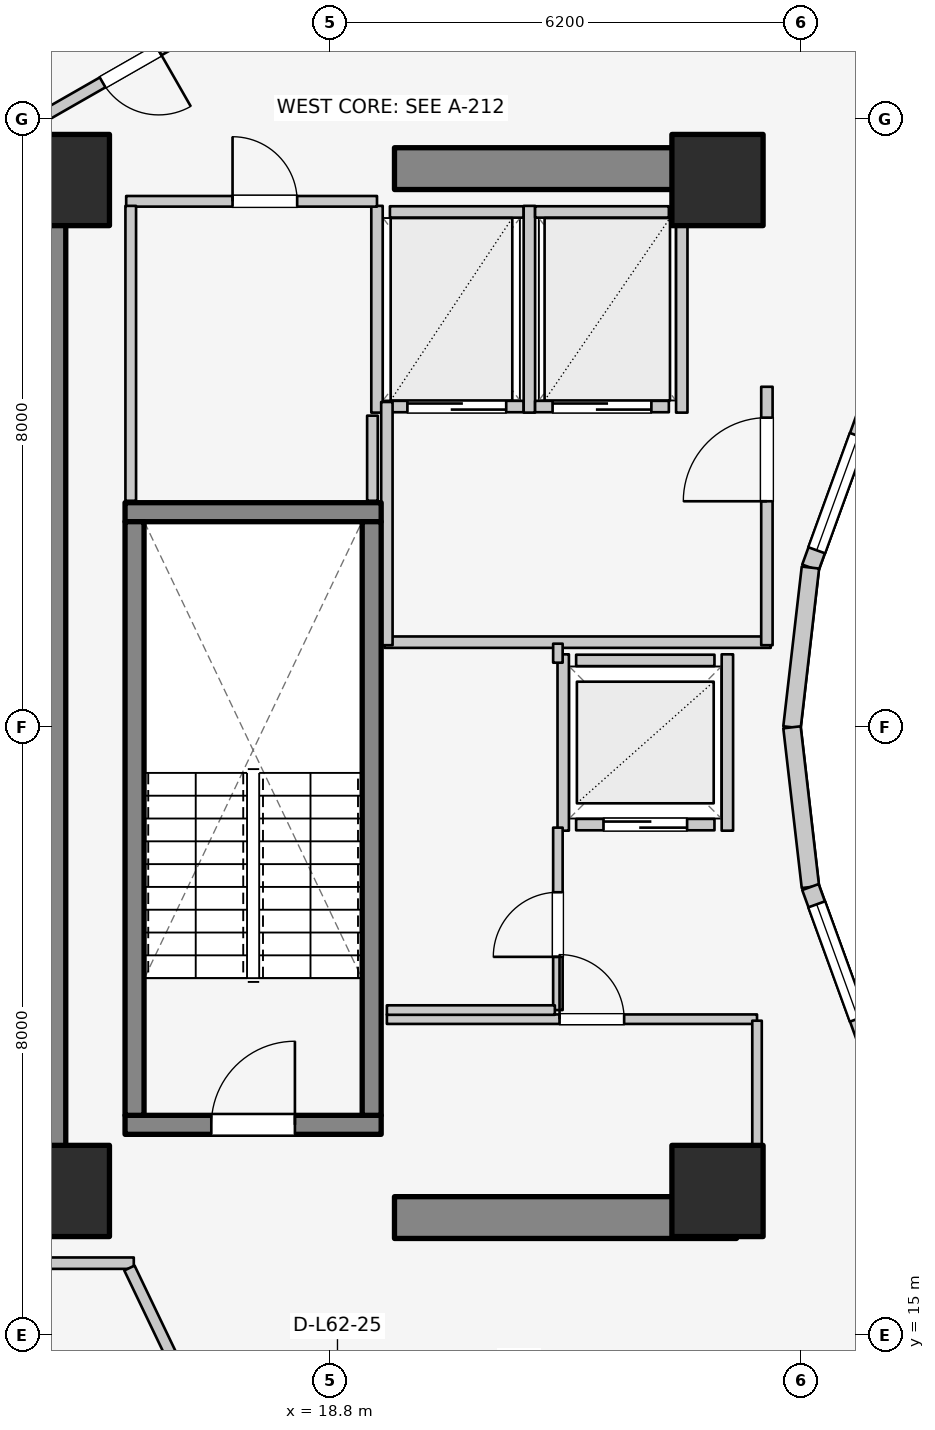
"""IFC4 building model, lengths in metres.
Left out: names, types, materials, properties, quantities, classifications, styles, units other than length and angle.
Written with IfcOpenShell. Run it as: python <this file> out.ifc"""

import sys

from ifc_helpers import new_model, si_unit, direction, frame, frame_2d, origin, origin_2d, place, context, subcontext, project, spatial, rectangle, extrude, element, fill, save


model = new_model("IFC4")
c1 = context("Model", 3, precision=1e-05, world=origin(), true_north=direction((0.0, 1.0)))
c2 = subcontext(c1, "Body", "Model", "MODEL_VIEW")
j1 = project(units=[si_unit("LENGTHUNIT", "METRE"), si_unit("PLANEANGLEUNIT", "RADIAN")], contexts=[c1])
p1 = place(None, origin())
s1 = spatial("IfcSite", under=j1, at=p1, CompositionType="ELEMENT")
p2 = place(p1, origin())
s2 = spatial("IfcBuilding", under=s1, at=p2, CompositionType="ELEMENT")
p3 = place(p2, frame((0.0, 0.0, 204.7)))
s3 = spatial("IfcBuildingStorey", under=s2, at=p3, CompositionType="ELEMENT", Elevation=204.7)
p4 = place(p3, frame((15.05, 17.05, 0.0), z_axis=(0.0, 0.0, 1.0), x_axis=(0.0, 1.0, 0.0)))
e1 = element("IfcWall", 1, at=p4, inside=s3, PredefinedType="SHEAR", context=c2, shape_type="SweptSolid", body=[
    extrude(rectangle(XDim=12.8, YDim=0.55, at=frame_2d((6.4, 0.0))), origin(), (0.0, 0.0, 1.0), 3.1),
])
for number, where, z_axis, x_axis in (
    (2, (19.65, 16.55, 0.0), (0.0, 0.0, 1.0), (1.0, 0.0, 0.0)),
    (3, (19.65, 30.35, 0.0), (0.0, 0.0, 1.0), (1.0, 0.0, 0.0)),
):
    element("IfcWall", number, at=place(p3, frame(where, z_axis=z_axis, x_axis=x_axis)), inside=s3, PredefinedType="SHEAR", context=c2, shape_type="SweptSolid", body=[
        extrude(rectangle(XDim=4.5, YDim=0.55, at=frame_2d((2.25, 0.0))), origin(), (0.0, 0.0, 1.0), 3.1),
    ])
p5 = place(p3, frame((16.105, 17.77, 0.0), z_axis=(0.0, 0.0, 1.0), x_axis=(1.0, 0.0, 0.0)))
e4 = element("IfcWall", 4, at=p5, inside=s3, PredefinedType="SOLIDWALL", context=c2, shape_type="SweptSolid", body=[
    extrude(rectangle(XDim=3.37, YDim=0.25, at=frame_2d((1.685, 0.0))), origin(), (0.0, 0.0, 1.0), 3.1),
])
p6 = place(p5, frame((1.135, 0.0, 0.0)))
e5 = element("IfcOpeningElement", 5, at=p6, cuts=e4, PredefinedType="OPENING", context=c2, shape_type="SweptSolid", body=[
    extrude(rectangle(XDim=1.1, YDim=2.1, at=frame_2d((0.55, 1.05))), frame((0.0, 0.135, 0.0), z_axis=(0.0, -1.0, 0.0), x_axis=(1.0, 0.0, 0.0)), (0.0, 0.0, 1.0), 0.27),
])
p7 = place(p3, frame((16.105, 25.83, 0.0), z_axis=(0.0, 0.0, 1.0), x_axis=(1.0, 0.0, 0.0)))
e6 = element("IfcWall", 6, at=p7, inside=s3, PredefinedType="SOLIDWALL", context=c2, shape_type="SweptSolid", body=[
    extrude(rectangle(XDim=3.37, YDim=0.25, at=frame_2d((1.685, 0.0))), origin(), (0.0, 0.0, 1.0), 3.1),
])
for number, where, z_axis, x_axis in (
    (7, (16.23, 17.895, 0.0), (0.0, 0.0, 1.0), (0.0, 1.0, 0.0)),
    (8, (19.35, 17.895, 0.0), (0.0, 0.0, 1.0), (0.0, 1.0, 0.0)),
):
    element("IfcWall", number, at=place(p3, frame(where, z_axis=z_axis, x_axis=x_axis)), inside=s3, PredefinedType="SOLIDWALL", context=c2, shape_type="SweptSolid", body=[
        extrude(rectangle(XDim=7.81, YDim=0.25, at=frame_2d((3.905, 0.0))), origin(), (0.0, 0.0, 1.0), 3.1),
    ])
for number, where, z_axis, x_axis in (
    (9, (15.3, 16.9, 0.0), (0.0, 0.0, 1.0), (1.0, 0.0, 0.0)),
    (10, (23.9, 16.9, 0.0), (0.0, 0.0, 1.0), (1.0, 0.0, 0.0)),
    (11, (23.9, 30.2, 0.0), (0.0, 0.0, 1.0), (1.0, 0.0, 0.0)),
    (12, (15.3, 30.2, 0.0), (0.0, 0.0, 1.0), (1.0, 0.0, 0.0)),
):
    element("IfcColumn", number, at=place(p3, frame(where, z_axis=z_axis, x_axis=x_axis)), inside=s3, PredefinedType="COLUMN", context=c2, shape_type="SweptSolid", body=[
        extrude(rectangle(XDim=1.2, YDim=1.2, at=origin_2d()), origin(), (0.0, 0.0, 1.0), 3.1),
    ])
p8 = place(p3, frame((25.834, 27.06, 0.0), z_axis=(0.0, 0.0, 1.0), x_axis=(-0.341423187295, -0.93990968033, 0.0)))
e13 = element("IfcWall", 13, at=p8, inside=s3, PredefinedType="STANDARD", context=c2, shape_type="SweptSolid", body=[
    extrude(rectangle(XDim=2.084, YDim=0.23, at=frame_2d((1.042, 0.0))), origin(), (0.0, 0.0, 1.0), 2.84),
])
p9 = place(p8, frame((0.242, 0.0, 0.85)))
e14 = element("IfcOpeningElement", 14, at=p9, cuts=e13, PredefinedType="OPENING", context=c2, shape_type="SweptSolid", body=[
    extrude(rectangle(XDim=1.6, YDim=1.65, at=frame_2d((0.8, 0.825))), frame((0.0, 0.125, 0.0), z_axis=(0.0, -1.0, 0.0), x_axis=(1.0, 0.0, 0.0)), (0.0, 0.0, 1.0), 0.25),
])
for number, where, z_axis, x_axis in (
    (15, (25.123, 25.102, 0.0), (0.0, 0.0, 1.0), (-0.115, -0.993, 0.0)),
    (16, (24.88, 23.0, 0.0), (0.0, 0.0, 1.0), (0.115, -0.993, 0.0)),
):
    element("IfcWall", number, at=place(p3, frame(where, z_axis=z_axis, x_axis=x_axis)), inside=s3, PredefinedType="STANDARD", context=c2, shape_type="SweptSolid", body=[
        extrude(rectangle(XDim=2.115, YDim=0.23, at=frame_2d((1.058, 0.0))), origin(), (0.0, 0.0, 1.0), 2.84),
    ])
p10 = place(p3, frame((25.123, 20.898, 0.0), z_axis=(0.0, 0.0, 1.0), x_axis=(0.341423187295, -0.93990968033, 0.0)))
e17 = element("IfcWall", 17, at=p10, inside=s3, PredefinedType="STANDARD", context=c2, shape_type="SweptSolid", body=[
    extrude(rectangle(XDim=2.084, YDim=0.23, at=frame_2d((1.042, 0.0))), origin(), (0.0, 0.0, 1.0), 2.84),
])
p11 = place(p10, frame((0.242, 0.0, 0.85)))
e18 = element("IfcOpeningElement", 18, at=p11, cuts=e17, PredefinedType="OPENING", context=c2, shape_type="SweptSolid", body=[
    extrude(rectangle(XDim=1.6, YDim=1.65, at=frame_2d((0.8, 0.825))), frame((0.0, 0.125, 0.0), z_axis=(0.0, -1.0, 0.0), x_axis=(1.0, 0.0, 0.0)), (0.0, 0.0, 1.0), 0.25),
])
p12 = place(p3, frame((16.442, 34.272, 0.0), z_axis=(0.0, 0.0, 1.0), x_axis=(-0.792713817907, -0.609593965603, 0.0)))
e19 = element("IfcWall", 19, at=p12, inside=s3, PredefinedType="STANDARD", context=c2, shape_type="SweptSolid", body=[
    extrude(rectangle(XDim=4.041, YDim=0.26, at=frame_2d((2.021, 0.0))), origin(), (0.0, 0.0, 1.0), 2.85),
])
p13 = place(p12, frame((2.264, 0.0, 0.75)))
e20 = element("IfcOpeningElement", 20, at=p13, cuts=e19, PredefinedType="OPENING", context=c2, shape_type="SweptSolid", body=[
    extrude(rectangle(XDim=1.2, YDim=1.5, at=frame_2d((0.6, 0.75))), frame((0.0, 0.14, 0.0), z_axis=(0.0, -1.0, 0.0), x_axis=(1.0, 0.0, 0.0)), (0.0, 0.0, 1.0), 0.28),
])
p14 = place(p3, frame((22.04, 21.72, 0.0), z_axis=(0.0, 0.0, 1.0), x_axis=(1.0, 0.0, 0.0)))
e21 = element("IfcWall", 21, at=p14, inside=s3, PredefinedType="SOLIDWALL", context=c2, shape_type="SweptSolid", body=[
    extrude(rectangle(XDim=1.82, YDim=0.15, at=frame_2d((0.91, 0.0))), origin(), (0.0, 0.0, 1.0), 2.12),
])
p15 = place(p14, frame((0.36, 0.0, 0.0)))
e22 = element("IfcOpeningElement", 22, at=p15, cuts=e21, PredefinedType="OPENING", context=c2, shape_type="SweptSolid", body=[
    extrude(rectangle(XDim=1.1, YDim=2.1, at=frame_2d((0.55, 1.05))), frame((0.0, 0.085, 0.0), z_axis=(0.0, -1.0, 0.0), x_axis=(1.0, 0.0, 0.0)), (0.0, 0.0, 1.0), 0.17),
])
p16 = place(p3, frame((22.04, 23.88, 0.0), z_axis=(0.0, 0.0, 1.0), x_axis=(1.0, 0.0, 0.0)))
e23 = element("IfcWall", 23, at=p16, inside=s3, PredefinedType="SOLIDWALL", context=c2, shape_type="SweptSolid", body=[
    extrude(rectangle(XDim=1.82, YDim=0.15, at=frame_2d((0.91, 0.0))), origin(), (0.0, 0.0, 1.0), 2.12),
])
p17 = place(p3, frame((21.87, 21.64, 0.0), z_axis=(0.0, 0.0, 1.0), x_axis=(0.0, 1.0, 0.0)))
e24 = element("IfcWall", 24, at=p17, inside=s3, PredefinedType="SOLIDWALL", context=c2, shape_type="SweptSolid", body=[
    extrude(rectangle(XDim=2.32, YDim=0.15, at=frame_2d((1.16, 0.0))), origin(), (0.0, 0.0, 1.0), 2.855),
])
p18 = place(p3, frame((24.03, 21.64, 0.0), z_axis=(0.0, 0.0, 1.0), x_axis=(0.0, 1.0, 0.0)))
e25 = element("IfcWall", 25, at=p18, inside=s3, PredefinedType="SOLIDWALL", context=c2, shape_type="SweptSolid", body=[
    extrude(rectangle(XDim=2.32, YDim=0.15, at=frame_2d((1.16, 0.0))), origin(), (0.0, 0.0, 1.0), 2.12),
])
p19 = place(p3, frame((19.59, 27.22, 0.0), z_axis=(0.0, 0.0, 1.0), x_axis=(1.0, 0.0, 0.0)))
e26 = element("IfcWall", 26, at=p19, inside=s3, PredefinedType="SOLIDWALL", context=c2, shape_type="SweptSolid", body=[
    extrude(rectangle(XDim=1.76, YDim=0.15, at=frame_2d((0.88, 0.0))), origin(), (0.0, 0.0, 1.0), 2.855),
])
p20 = place(p19, frame((0.23, 0.0, 0.0)))
e27 = element("IfcOpeningElement", 27, at=p20, cuts=e26, PredefinedType="OPENING", context=c2, shape_type="SweptSolid", body=[
    extrude(rectangle(XDim=1.3, YDim=2.1, at=frame_2d((0.65, 1.05))), frame((0.0, 0.085, 0.0), z_axis=(0.0, -1.0, 0.0), x_axis=(1.0, 0.0, 0.0)), (0.0, 0.0, 1.0), 0.17),
])
p21 = place(p3, frame((19.59, 29.78, 0.0), z_axis=(0.0, 0.0, 1.0), x_axis=(1.0, 0.0, 0.0)))
e28 = element("IfcWall", 28, at=p21, inside=s3, PredefinedType="SOLIDWALL", context=c2, shape_type="SweptSolid", body=[
    extrude(rectangle(XDim=1.76, YDim=0.15, at=frame_2d((0.88, 0.0))), origin(), (0.0, 0.0, 1.0), 2.855),
])
for number, where, z_axis, x_axis in (
    (29, (19.42, 27.14, 0.0), (0.0, 0.0, 1.0), (0.0, 1.0, 0.0)),
    (30, (21.425, 27.14, 0.0), (0.0, 0.0, 1.0), (0.0, 1.0, 0.0)),
):
    element("IfcWall", number, at=place(p3, frame(where, z_axis=z_axis, x_axis=x_axis)), inside=s3, PredefinedType="SOLIDWALL", context=c2, shape_type="SweptSolid", body=[
        extrude(rectangle(XDim=2.72, YDim=0.15, at=frame_2d((1.36, 0.0))), origin(), (0.0, 0.0, 1.0), 2.855),
    ])
p22 = place(p3, frame((21.5, 27.22, 0.0), z_axis=(0.0, 0.0, 1.0), x_axis=(1.0, 0.0, 0.0)))
e31 = element("IfcWall", 31, at=p22, inside=s3, PredefinedType="SOLIDWALL", context=c2, shape_type="SweptSolid", body=[
    extrude(rectangle(XDim=1.76, YDim=0.15, at=frame_2d((0.88, 0.0))), origin(), (0.0, 0.0, 1.0), 2.855),
])
p23 = place(p22, frame((0.23, 0.0, 0.0)))
e32 = element("IfcOpeningElement", 32, at=p23, cuts=e31, PredefinedType="OPENING", context=c2, shape_type="SweptSolid", body=[
    extrude(rectangle(XDim=1.3, YDim=2.1, at=frame_2d((0.65, 1.05))), frame((0.0, 0.085, 0.0), z_axis=(0.0, -1.0, 0.0), x_axis=(1.0, 0.0, 0.0)), (0.0, 0.0, 1.0), 0.17),
])
p24 = place(p3, frame((21.5, 29.78, 0.0), z_axis=(0.0, 0.0, 1.0), x_axis=(1.0, 0.0, 0.0)))
e33 = element("IfcWall", 33, at=p24, inside=s3, PredefinedType="SOLIDWALL", context=c2, shape_type="SweptSolid", body=[
    extrude(rectangle(XDim=1.76, YDim=0.15, at=frame_2d((0.88, 0.0))), origin(), (0.0, 0.0, 1.0), 2.855),
])
p25 = place(p3, frame((23.43, 27.14, 0.0), z_axis=(0.0, 0.0, 1.0), x_axis=(0.0, 1.0, 0.0)))
e34 = element("IfcWall", 34, at=p25, inside=s3, PredefinedType="SOLIDWALL", context=c2, shape_type="SweptSolid", body=[
    extrude(rectangle(XDim=2.72, YDim=0.15, at=frame_2d((1.36, 0.0))), origin(), (0.0, 0.0, 1.0), 2.855),
])
p26 = place(p3, frame((19.52, 24.12, 0.0), z_axis=(0.0, 0.0, 1.0), x_axis=(1.0, 0.0, 0.0)))
e35 = element("IfcWall", 35, at=p26, inside=s3, PredefinedType="PARTITIONING", context=c2, shape_type="SweptSolid", body=[
    extrude(rectangle(XDim=5.08, YDim=0.15, at=frame_2d((2.54, 0.0))), origin(), (0.0, 0.0, 1.0), 2.12),
])
p27 = place(p3, frame((19.55, 24.08, 0.0), z_axis=(0.0, 0.0, 1.0), x_axis=(0.0, 1.0, 0.0)))
e36 = element("IfcWall", 36, at=p27, inside=s3, PredefinedType="PARTITIONING", context=c2, shape_type="SweptSolid", body=[
    extrude(rectangle(XDim=3.2, YDim=0.15, at=frame_2d((1.6, 0.0))), origin(), (0.0, 0.0, 1.0), 2.855),
])
p28 = place(p3, frame((24.55, 24.08, 0.0), z_axis=(0.0, 0.0, 1.0), x_axis=(0.0, 1.0, 0.0)))
e37 = element("IfcWall", 37, at=p28, inside=s3, PredefinedType="PARTITIONING", context=c2, shape_type="SweptSolid", body=[
    extrude(rectangle(XDim=3.4, YDim=0.15, at=frame_2d((1.7, 0.0))), origin(), (0.0, 0.0, 1.0), 2.855),
])
p29 = place(p28, frame((1.894, 0.0, 0.0)))
e38 = element("IfcOpeningElement", 38, at=p29, cuts=e37, PredefinedType="OPENING", context=c2, shape_type="SweptSolid", body=[
    extrude(rectangle(XDim=1.1, YDim=2.1, at=frame_2d((0.55, 1.05))), frame((0.0, 0.085, 0.0), z_axis=(0.0, -1.0, 0.0), x_axis=(1.0, 0.0, 0.0)), (0.0, 0.0, 1.0), 0.17),
])
p30 = place(p3, frame((19.55, 19.16, 0.0), z_axis=(0.0, 0.0, 1.0), x_axis=(1.0, 0.0, 0.0)))
e39 = element("IfcWall", 39, at=p30, inside=s3, PredefinedType="PARTITIONING", context=c2, shape_type="SweptSolid", body=[
    extrude(rectangle(XDim=4.87, YDim=0.125, at=frame_2d((2.435, 0.0))), origin(), (0.0, 0.0, 1.0), 2.12),
])
p31 = place(p30, frame((2.272, 0.0, 0.0)))
e40 = element("IfcOpeningElement", 40, at=p31, cuts=e39, PredefinedType="OPENING", context=c2, shape_type="SweptSolid", body=[
    extrude(rectangle(XDim=0.85, YDim=2.05, at=frame_2d((0.425, 1.025))), frame((0.0, 0.073, 0.0), z_axis=(0.0, -1.0, 0.0), x_axis=(1.0, 0.0, 0.0)), (0.0, 0.0, 1.0), 0.145),
])
p32 = place(p3, frame((24.42, 17.1, 0.0), z_axis=(0.0, 0.0, 1.0), x_axis=(0.0, 1.0, 0.0)))
e41 = element("IfcWall", 41, at=p32, inside=s3, PredefinedType="PARTITIONING", context=c2, shape_type="SweptSolid", body=[
    extrude(rectangle(XDim=2.04, YDim=0.125, at=frame_2d((1.02, 0.0))), origin(), (0.0, 0.0, 1.0), 2.232),
])
p33 = place(p3, frame((21.8, 19.28, 0.0), z_axis=(0.0, 0.0, 1.0), x_axis=(0.0, 1.0, 0.0)))
e42 = element("IfcWall", 42, at=p33, inside=s3, PredefinedType="PARTITIONING", context=c2, shape_type="SweptSolid", body=[
    extrude(rectangle(XDim=2.4, YDim=0.125, at=frame_2d((1.2, 0.0))), origin(), (0.0, 0.0, 1.0), 2.855),
])
p34 = place(p33, frame((0.7, 0.0, 0.0)))
e43 = element("IfcOpeningElement", 43, at=p34, cuts=e42, PredefinedType="OPENING", context=c2, shape_type="SweptSolid", body=[
    extrude(rectangle(XDim=0.85, YDim=2.05, at=frame_2d((0.425, 1.025))), frame((0.0, 0.073, 0.0), z_axis=(0.0, -1.0, 0.0), x_axis=(1.0, 0.0, 0.0)), (0.0, 0.0, 1.0), 0.145),
])
p35 = place(p3, frame((21.8, 23.85, 0.0), z_axis=(0.0, 0.0, 1.0), x_axis=(0.0, 1.0, 0.0)))
e44 = element("IfcWall", 44, at=p35, inside=s3, PredefinedType="PARTITIONING", context=c2, shape_type="SweptSolid", body=[
    extrude(rectangle(XDim=0.25, YDim=0.125, at=frame_2d((0.125, 0.0))), origin(), (0.0, 0.0, 1.0), 2.855),
])
p36 = place(p3, frame((19.55, 19.28, 0.0), z_axis=(0.0, 0.0, 1.0), x_axis=(1.0, 0.0, 0.0)))
e45 = element("IfcWall", 45, at=p36, inside=s3, PredefinedType="PARTITIONING", context=c2, shape_type="SweptSolid", body=[
    extrude(rectangle(XDim=2.21, YDim=0.125, at=frame_2d((1.105, 0.0))), origin(), (0.0, 0.0, 1.0), 2.12),
])
p37 = place(p3, frame((16.12, 29.92, 0.0), z_axis=(0.0, 0.0, 1.0), x_axis=(1.0, 0.0, 0.0)))
e46 = element("IfcWall", 46, at=p37, inside=s3, PredefinedType="PLUMBINGWALL", context=c2, shape_type="SweptSolid", body=[
    extrude(rectangle(XDim=3.3, YDim=0.14, at=frame_2d((1.65, 0.0))), origin(), (0.0, 0.0, 1.0), 2.855),
])
p38 = place(p37, frame((1.399, 0.0, 0.0)))
e47 = element("IfcOpeningElement", 47, at=p38, cuts=e46, PredefinedType="OPENING", context=c2, shape_type="SweptSolid", body=[
    extrude(rectangle(XDim=0.85, YDim=2.05, at=frame_2d((0.425, 1.025))), frame((0.0, 0.08, 0.0), z_axis=(0.0, -1.0, 0.0), x_axis=(1.0, 0.0, 0.0)), (0.0, 0.0, 1.0), 0.16),
])
p39 = place(p3, frame((16.18, 25.98, 0.0), z_axis=(0.0, 0.0, 1.0), x_axis=(0.0, 1.0, 0.0)))
e48 = element("IfcWall", 48, at=p39, inside=s3, PredefinedType="PLUMBINGWALL", context=c2, shape_type="SweptSolid", body=[
    extrude(rectangle(XDim=3.88, YDim=0.14, at=frame_2d((1.94, 0.0))), origin(), (0.0, 0.0, 1.0), 2.855),
])
p40 = place(p3, frame((19.36, 25.98, 0.0), z_axis=(0.0, 0.0, 1.0), x_axis=(0.0, 1.0, 0.0)))
e49 = element("IfcWall", 49, at=p40, inside=s3, PredefinedType="PLUMBINGWALL", context=c2, shape_type="SweptSolid", body=[
    extrude(rectangle(XDim=1.12, YDim=0.14, at=frame_2d((0.56, 0.0))), origin(), (0.0, 0.0, 1.0), 2.855),
])
p41 = place(p3, frame((17.243, 32.305, 0.0), z_axis=(0.0, 0.0, 1.0), x_axis=(-0.867991349648, -0.496579315857, 0.0)))
e50 = element("IfcWall", 50, at=p41, inside=s3, PredefinedType="PARTITIONING", context=c2, shape_type="SweptSolid", body=[
    extrude(rectangle(XDim=2.567, YDim=0.15, at=frame_2d((1.283, 0.0))), origin(), (0.0, 0.0, 1.0), 2.22),
])
p42 = place(p41, frame((0.802, 0.0, 0.0)))
e51 = element("IfcOpeningElement", 51, at=p42, cuts=e50, PredefinedType="OPENING", context=c2, shape_type="SweptSolid", body=[
    extrude(rectangle(XDim=0.85, YDim=2.05, at=frame_2d((0.425, 1.025))), frame((0.0, 0.085, 0.0), z_axis=(0.0, -1.0, 0.0), x_axis=(1.0, 0.0, 0.0)), (0.0, 0.0, 1.0), 0.17),
])
p43 = place(p3, frame((11.98, 15.95, 0.0), z_axis=(0.0, 0.0, 1.0), x_axis=(1.0, 0.0, 0.0)))
e52 = element("IfcWall", 52, at=p43, inside=s3, PredefinedType="PARTITIONING", context=c2, shape_type="SweptSolid", body=[
    extrude(rectangle(XDim=4.24, YDim=0.15, at=frame_2d((2.12, 0.0))), origin(), (0.0, 0.0, 1.0), 2.22),
])
p44 = place(p3, frame((17.222, 13.675, 0.0), z_axis=(0.0, 0.0, 1.0), x_axis=(-0.431973389813, 0.901886351207, 0.0)))
e53 = element("IfcWall", 53, at=p44, inside=s3, PredefinedType="PARTITIONING", context=c2, shape_type="SweptSolid", body=[
    extrude(rectangle(XDim=2.452, YDim=0.15, at=frame_2d((1.226, 0.0))), origin(), (0.0, 0.0, 1.0), 2.855),
])
p45 = place(p9, origin())
e54 = element("IfcWindow", 54, at=p45, inside=s3, PartitioningType="SINGLE_PANEL", PredefinedType="WINDOW", context=c2, shape_type="SweptSolid", body=[
    extrude(rectangle(XDim=1.6, YDim=1.65, at=frame_2d((0.8, 0.825))), frame((0.0, 0.03, 0.0), z_axis=(0.0, -1.0, 0.0), x_axis=(1.0, 0.0, 0.0)), (0.0, 0.0, 1.0), 0.06),
])
fill(e14, e54)
p46 = place(p11, origin())
e55 = element("IfcWindow", 55, at=p46, inside=s3, PartitioningType="SINGLE_PANEL", PredefinedType="WINDOW", context=c2, shape_type="SweptSolid", body=[
    extrude(rectangle(XDim=1.6, YDim=1.65, at=frame_2d((0.8, 0.825))), frame((0.0, 0.03, 0.0), z_axis=(0.0, -1.0, 0.0), x_axis=(1.0, 0.0, 0.0)), (0.0, 0.0, 1.0), 0.06),
])
fill(e18, e55)
p47 = place(p6, origin())
e56 = element("IfcDoor", 56, at=p47, inside=s3, OperationType="SINGLE_SWING_RIGHT", PredefinedType="DOOR", context=c2, shape_type="SweptSolid", body=[
    extrude(rectangle(XDim=1.1, YDim=2.1, at=frame_2d((0.55, 1.05))), frame((0.0, 0.025, 0.0), z_axis=(0.0, -1.0, 0.0), x_axis=(1.0, 0.0, 0.0)), (0.0, 0.0, 1.0), 0.05),
])
fill(e5, e56)
p48 = place(p15, origin())
e57 = element("IfcDoor", 57, at=p48, inside=s3, OperationType="DOUBLE_DOOR_SLIDING", PredefinedType="DOOR", context=c2, shape_type="SweptSolid", body=[
    extrude(rectangle(XDim=1.1, YDim=2.1, at=frame_2d((0.55, 1.05))), frame((0.0, 0.025, 0.0), z_axis=(0.0, -1.0, 0.0), x_axis=(1.0, 0.0, 0.0)), (0.0, 0.0, 1.0), 0.05),
])
fill(e22, e57)
p49 = place(p20, origin())
e58 = element("IfcDoor", 58, at=p49, inside=s3, OperationType="DOUBLE_DOOR_SLIDING", PredefinedType="DOOR", context=c2, shape_type="SweptSolid", body=[
    extrude(rectangle(XDim=1.3, YDim=2.1, at=frame_2d((0.65, 1.05))), frame((0.0, 0.025, 0.0), z_axis=(0.0, -1.0, 0.0), x_axis=(1.0, 0.0, 0.0)), (0.0, 0.0, 1.0), 0.05),
])
fill(e27, e58)
p50 = place(p23, origin())
e59 = element("IfcDoor", 59, at=p50, inside=s3, OperationType="DOUBLE_DOOR_SLIDING", PredefinedType="DOOR", context=c2, shape_type="SweptSolid", body=[
    extrude(rectangle(XDim=1.3, YDim=2.1, at=frame_2d((0.65, 1.05))), frame((0.0, 0.025, 0.0), z_axis=(0.0, -1.0, 0.0), x_axis=(1.0, 0.0, 0.0)), (0.0, 0.0, 1.0), 0.05),
])
fill(e32, e59)
p51 = place(p29, origin())
e60 = element("IfcDoor", 60, at=p51, inside=s3, OperationType="SINGLE_SWING_LEFT", PredefinedType="DOOR", context=c2, shape_type="SweptSolid", body=[
    extrude(rectangle(XDim=1.1, YDim=2.1, at=frame_2d((0.55, 1.05))), frame((0.0, 0.025, 0.0), z_axis=(0.0, -1.0, 0.0), x_axis=(1.0, 0.0, 0.0)), (0.0, 0.0, 1.0), 0.05),
])
fill(e38, e60)
p52 = place(p31, origin())
e61 = element("IfcDoor", 61, at=p52, inside=s3, OperationType="SINGLE_SWING_LEFT", PredefinedType="DOOR", context=c2, shape_type="SweptSolid", body=[
    extrude(rectangle(XDim=0.85, YDim=2.05, at=frame_2d((0.425, 1.025))), frame((0.0, 0.025, 0.0), z_axis=(0.0, -1.0, 0.0), x_axis=(1.0, 0.0, 0.0)), (0.0, 0.0, 1.0), 0.05),
])
fill(e40, e61)
p53 = place(p34, origin())
e62 = element("IfcDoor", 62, at=p53, inside=s3, OperationType="SINGLE_SWING_LEFT", PredefinedType="DOOR", context=c2, shape_type="SweptSolid", body=[
    extrude(rectangle(XDim=0.85, YDim=2.05, at=frame_2d((0.425, 1.025))), frame((0.0, 0.025, 0.0), z_axis=(0.0, -1.0, 0.0), x_axis=(1.0, 0.0, 0.0)), (0.0, 0.0, 1.0), 0.05),
])
fill(e43, e62)
p54 = place(p38, origin())
e63 = element("IfcDoor", 63, at=p54, inside=s3, OperationType="SINGLE_SWING_LEFT", PredefinedType="DOOR", context=c2, shape_type="SweptSolid", body=[
    extrude(rectangle(XDim=0.85, YDim=2.05, at=frame_2d((0.425, 1.025))), frame((0.0, 0.025, 0.0), z_axis=(0.0, -1.0, 0.0), x_axis=(1.0, 0.0, 0.0)), (0.0, 0.0, 1.0), 0.05),
])
fill(e47, e63)
p55 = place(p42, origin())
e64 = element("IfcDoor", 64, at=p55, inside=s3, OperationType="SINGLE_SWING_LEFT", PredefinedType="DOOR", context=c2, shape_type="SweptSolid", body=[
    extrude(rectangle(XDim=0.85, YDim=2.05, at=frame_2d((0.425, 1.025))), frame((0.0, 0.025, 0.0), z_axis=(0.0, -1.0, 0.0), x_axis=(1.0, 0.0, 0.0)), (0.0, 0.0, 1.0), 0.05),
])
fill(e51, e64)
save(model, sys.argv[1])
